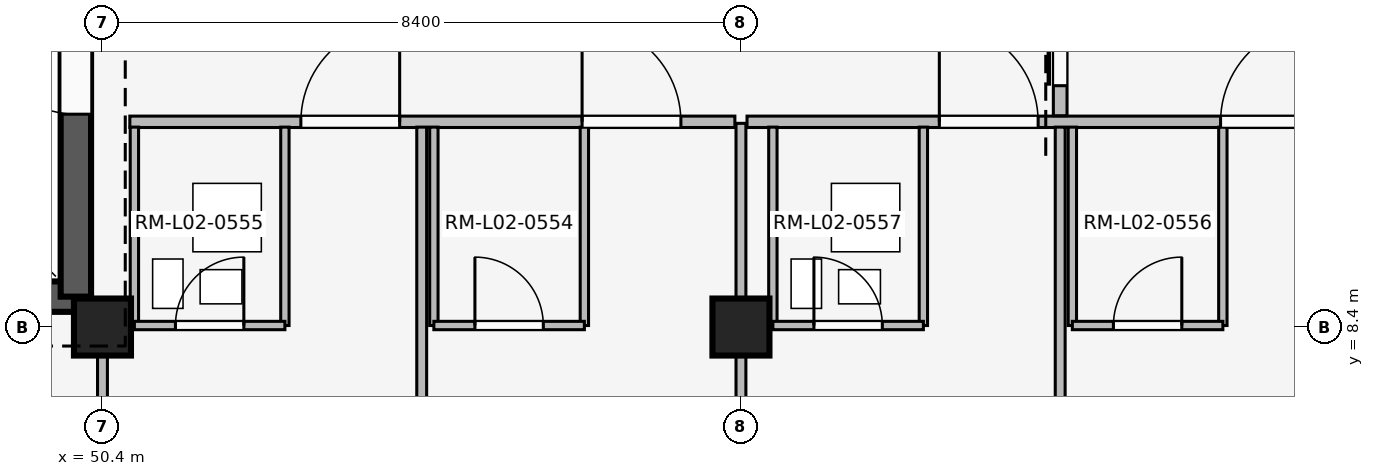
"""IFC4 building model, lengths in metres.
Left out: names, types, materials, properties, quantities, classifications, styles, units other than length and angle.
Written with IfcOpenShell. Run it as: python <this file> out.ifc"""

import sys

from ifc_helpers import new_model, si_unit, direction, frame, frame_2d, origin, origin_2d, place, context, subcontext, project, spatial, rectangle, extrude, element, fill, save


model = new_model("IFC4")
c1 = context("Model", 3, precision=1e-05, world=origin(), true_north=direction((0.0, 1.0)))
c2 = subcontext(c1, "Body", "Model", "MODEL_VIEW")
j1 = project(units=[si_unit("LENGTHUNIT", "METRE"), si_unit("PLANEANGLEUNIT", "RADIAN")], contexts=[c1])
p1 = place(None, origin())
s1 = spatial("IfcSite", under=j1, at=p1, CompositionType="ELEMENT")
p2 = place(p1, origin())
s2 = spatial("IfcBuilding", under=s1, at=p2, CompositionType="ELEMENT")
p3 = place(p2, frame((0.0, 0.0, 8.1)))
s3 = spatial("IfcBuildingStorey", under=s2, at=p3, CompositionType="ELEMENT", Elevation=8.1)
for number, where, z_axis, x_axis in (
    (1, (50.4, 8.4, 0.0), (0.0, 0.0, 1.0), (1.0, 0.0, 0.0)),
    (2, (58.8, 8.4, 0.0), (0.0, 0.0, 1.0), (1.0, 0.0, 0.0)),
):
    element("IfcColumn", number, at=place(p3, frame(where, z_axis=z_axis, x_axis=x_axis)), inside=s3, PredefinedType="COLUMN", context=c2, shape_type="SweptSolid", body=[
        extrude(rectangle(XDim=0.75, YDim=0.75, at=origin_2d()), origin(), (0.0, 0.0, 1.0), 4.8),
    ])
p4 = place(p3, frame((42.55, 8.8, 0.0), z_axis=(0.0, 0.0, 1.0), x_axis=(1.0, 0.0, 0.0)))
e3 = element("IfcWall", 3, at=p4, inside=s3, PredefinedType="SHEAR", context=c2, shape_type="SweptSolid", body=[
    extrude(rectangle(XDim=7.5, YDim=0.4, at=frame_2d((3.75, 0.0))), origin(), (0.0, 0.0, 1.0), 4.52),
])
p5 = place(p4, frame((4.85, 0.0, 0.0)))
e4 = element("IfcOpeningElement", 4, at=p5, cuts=e3, PredefinedType="OPENING", context=c2, shape_type="SweptSolid", body=[
    extrude(rectangle(XDim=1.2, YDim=2.2, at=frame_2d((0.6, 1.1))), frame((0.0, 0.21, 0.0), z_axis=(0.0, -1.0, 0.0), x_axis=(1.0, 0.0, 0.0)), (0.0, 0.0, 1.0), 0.42),
])
p6 = place(p3, frame((50.05, 8.8, 0.0), z_axis=(0.0, 0.0, 1.0), x_axis=(0.0, 1.0, 0.0)))
e5 = element("IfcWall", 5, at=p6, inside=s3, PredefinedType="SHEAR", context=c2, shape_type="SweptSolid", body=[
    extrude(rectangle(XDim=7.55, YDim=0.4, at=frame_2d((3.775, 0.0))), origin(), (0.0, 0.0, 1.0), 4.52),
])
p7 = place(p6, frame((2.4, 0.0, 0.0)))
e6 = element("IfcOpeningElement", 6, at=p7, cuts=e5, PredefinedType="OPENING", context=c2, shape_type="SweptSolid", body=[
    extrude(rectangle(XDim=1.2, YDim=2.2, at=frame_2d((0.6, 1.1))), frame((0.0, 0.21, 0.0), z_axis=(0.0, -1.0, 0.0), x_axis=(1.0, 0.0, 0.0)), (0.0, 0.0, 1.0), 0.42),
])
p8 = place(p3, frame((50.4, 0.14, 0.0), z_axis=(0.0, 0.0, 1.0), x_axis=(0.0, 1.0, 0.0)))
e7 = element("IfcWall", 7, at=p8, inside=s3, PredefinedType="PARTITIONING", context=c2, shape_type="SweptSolid", body=[
    extrude(rectangle(XDim=8.21, YDim=0.13, at=frame_2d((4.105, 0.0))), origin(), (0.0, 0.0, 1.0), 3.84),
])
p9 = place(p8, frame((3.64, 0.0, 0.0)))
e8 = element("IfcOpeningElement", 8, at=p9, cuts=e7, PredefinedType="OPENING", context=c2, shape_type="SweptSolid", body=[
    extrude(rectangle(XDim=1.08, YDim=2.15, at=frame_2d((0.54, 1.075))), frame((0.0, 0.075, 0.0), z_axis=(0.0, -1.0, 0.0), x_axis=(1.0, 0.0, 0.0)), (0.0, 0.0, 1.0), 0.15),
])
p10 = place(p3, frame((50.76, 11.1, 0.0), z_axis=(0.0, 0.0, 1.0), x_axis=(1.0, 0.0, 0.0)))
e9 = element("IfcWall", 9, at=p10, inside=s3, PredefinedType="PARTITIONING", context=c2, shape_type="SweptSolid", body=[
    extrude(rectangle(XDim=7.96, YDim=0.15, at=frame_2d((3.98, 0.0))), origin(), (0.0, 0.0, 1.0), 3.84),
])
p11 = place(p10, frame((2.25, 0.0, 0.0)))
e10 = element("IfcOpeningElement", 10, at=p11, cuts=e9, PredefinedType="OPENING", context=c2, shape_type="SweptSolid", body=[
    extrude(rectangle(XDim=1.3, YDim=2.25, at=frame_2d((0.65, 1.125))), frame((0.0, 0.085, 0.0), z_axis=(0.0, -1.0, 0.0), x_axis=(1.0, 0.0, 0.0)), (0.0, 0.0, 1.0), 0.17),
])
p12 = place(p10, frame((5.95, 0.0, 0.0)))
e11 = element("IfcOpeningElement", 11, at=p12, cuts=e9, PredefinedType="OPENING", context=c2, shape_type="SweptSolid", body=[
    extrude(rectangle(XDim=1.3, YDim=2.25, at=frame_2d((0.65, 1.125))), frame((0.0, 0.085, 0.0), z_axis=(0.0, -1.0, 0.0), x_axis=(1.0, 0.0, 0.0)), (0.0, 0.0, 1.0), 0.17),
])
p13 = place(p3, frame((54.6, 0.1, 0.0), z_axis=(0.0, 0.0, 1.0), x_axis=(0.0, 1.0, 0.0)))
e12 = element("IfcWall", 12, at=p13, inside=s3, PredefinedType="PARTITIONING", context=c2, shape_type="SweptSolid", body=[
    extrude(rectangle(XDim=10.93, YDim=0.13, at=frame_2d((5.465, 0.0))), origin(), (0.0, 0.0, 1.0), 3.84),
])
for number, where, z_axis, x_axis in (
    (13, (50.82, 8.42, 0.0), (0.0, 0.0, 1.0), (0.0, 1.0, 0.0)),
    (14, (52.8, 8.42, 0.0), (0.0, 0.0, 1.0), (0.0, 1.0, 0.0)),
):
    element("IfcWall", number, at=place(p3, frame(where, z_axis=z_axis, x_axis=x_axis)), inside=s3, PredefinedType="PARTITIONING", context=c2, shape_type="SweptSolid", body=[
        extrude(rectangle(XDim=2.61, YDim=0.11, at=frame_2d((1.305, 0.0))), origin(), (0.0, 0.0, 1.0), 3.84),
    ])
p14 = place(p3, frame((50.82, 8.42, 0.0), z_axis=(0.0, 0.0, 1.0), x_axis=(1.0, 0.0, 0.0)))
e15 = element("IfcWall", 15, at=p14, inside=s3, PredefinedType="PARTITIONING", context=c2, shape_type="SweptSolid", body=[
    extrude(rectangle(XDim=1.98, YDim=0.11, at=frame_2d((0.99, 0.0))), origin(), (0.0, 0.0, 1.0), 3.84),
])
p15 = place(p14, frame((0.54, 0.0, 0.0)))
e16 = element("IfcOpeningElement", 16, at=p15, cuts=e15, PredefinedType="OPENING", context=c2, shape_type="SweptSolid", body=[
    extrude(rectangle(XDim=0.9, YDim=2.1, at=frame_2d((0.45, 1.05))), frame((0.0, 0.065, 0.0), z_axis=(0.0, -1.0, 0.0), x_axis=(1.0, 0.0, 0.0)), (0.0, 0.0, 1.0), 0.13),
])
for number, where, z_axis, x_axis in (
    (17, (54.76, 8.42, 0.0), (0.0, 0.0, 1.0), (0.0, 1.0, 0.0)),
    (18, (56.74, 8.42, 0.0), (0.0, 0.0, 1.0), (0.0, 1.0, 0.0)),
):
    element("IfcWall", number, at=place(p3, frame(where, z_axis=z_axis, x_axis=x_axis)), inside=s3, PredefinedType="PARTITIONING", context=c2, shape_type="SweptSolid", body=[
        extrude(rectangle(XDim=2.61, YDim=0.11, at=frame_2d((1.305, 0.0))), origin(), (0.0, 0.0, 1.0), 3.84),
    ])
p16 = place(p3, frame((54.76, 8.42, 0.0), z_axis=(0.0, 0.0, 1.0), x_axis=(1.0, 0.0, 0.0)))
e19 = element("IfcWall", 19, at=p16, inside=s3, PredefinedType="PARTITIONING", context=c2, shape_type="SweptSolid", body=[
    extrude(rectangle(XDim=1.98, YDim=0.11, at=frame_2d((0.99, 0.0))), origin(), (0.0, 0.0, 1.0), 3.84),
])
p17 = place(p16, frame((0.54, 0.0, 0.0)))
e20 = element("IfcOpeningElement", 20, at=p17, cuts=e19, PredefinedType="OPENING", context=c2, shape_type="SweptSolid", body=[
    extrude(rectangle(XDim=0.9, YDim=2.1, at=frame_2d((0.45, 1.05))), frame((0.0, 0.065, 0.0), z_axis=(0.0, -1.0, 0.0), x_axis=(1.0, 0.0, 0.0)), (0.0, 0.0, 1.0), 0.13),
])
p18 = place(p3, frame((58.8, 0.14, 0.0), z_axis=(0.0, 0.0, 1.0), x_axis=(0.0, 1.0, 0.0)))
e21 = element("IfcWall", 21, at=p18, inside=s3, PredefinedType="PARTITIONING", context=c2, shape_type="SweptSolid", body=[
    extrude(rectangle(XDim=10.94, YDim=0.13, at=frame_2d((5.47, 0.0))), origin(), (0.0, 0.0, 1.0), 3.84),
])
p19 = place(p3, frame((58.88, 11.1, 0.0), z_axis=(0.0, 0.0, 1.0), x_axis=(1.0, 0.0, 0.0)))
e22 = element("IfcWall", 22, at=p19, inside=s3, PredefinedType="PARTITIONING", context=c2, shape_type="SweptSolid", body=[
    extrude(rectangle(XDim=8.24, YDim=0.15, at=frame_2d((4.12, 0.0))), origin(), (0.0, 0.0, 1.0), 3.84),
])
p20 = place(p19, frame((2.53, 0.0, 0.0)))
e23 = element("IfcOpeningElement", 23, at=p20, cuts=e22, PredefinedType="OPENING", context=c2, shape_type="SweptSolid", body=[
    extrude(rectangle(XDim=1.3, YDim=2.25, at=frame_2d((0.65, 1.125))), frame((0.0, 0.085, 0.0), z_axis=(0.0, -1.0, 0.0), x_axis=(1.0, 0.0, 0.0)), (0.0, 0.0, 1.0), 0.17),
])
p21 = place(p19, frame((6.23, 0.0, 0.0)))
e24 = element("IfcOpeningElement", 24, at=p21, cuts=e22, PredefinedType="OPENING", context=c2, shape_type="SweptSolid", body=[
    extrude(rectangle(XDim=1.3, YDim=2.25, at=frame_2d((0.65, 1.125))), frame((0.0, 0.085, 0.0), z_axis=(0.0, -1.0, 0.0), x_axis=(1.0, 0.0, 0.0)), (0.0, 0.0, 1.0), 0.17),
])
p22 = place(p3, frame((63.0, 0.1, 0.0), z_axis=(0.0, 0.0, 1.0), x_axis=(0.0, 1.0, 0.0)))
e25 = element("IfcWall", 25, at=p22, inside=s3, PredefinedType="PARTITIONING", context=c2, shape_type="SweptSolid", body=[
    extrude(rectangle(XDim=10.93, YDim=0.13, at=frame_2d((5.465, 0.0))), origin(), (0.0, 0.0, 1.0), 3.84),
])
for number, where, z_axis, x_axis in (
    (26, (59.22, 8.42, 0.0), (0.0, 0.0, 1.0), (0.0, 1.0, 0.0)),
    (27, (61.2, 8.42, 0.0), (0.0, 0.0, 1.0), (0.0, 1.0, 0.0)),
):
    element("IfcWall", number, at=place(p3, frame(where, z_axis=z_axis, x_axis=x_axis)), inside=s3, PredefinedType="PARTITIONING", context=c2, shape_type="SweptSolid", body=[
        extrude(rectangle(XDim=2.61, YDim=0.11, at=frame_2d((1.305, 0.0))), origin(), (0.0, 0.0, 1.0), 3.84),
    ])
p23 = place(p3, frame((59.22, 8.42, 0.0), z_axis=(0.0, 0.0, 1.0), x_axis=(1.0, 0.0, 0.0)))
e28 = element("IfcWall", 28, at=p23, inside=s3, PredefinedType="PARTITIONING", context=c2, shape_type="SweptSolid", body=[
    extrude(rectangle(XDim=1.98, YDim=0.11, at=frame_2d((0.99, 0.0))), origin(), (0.0, 0.0, 1.0), 3.84),
])
p24 = place(p23, frame((0.54, 0.0, 0.0)))
e29 = element("IfcOpeningElement", 29, at=p24, cuts=e28, PredefinedType="OPENING", context=c2, shape_type="SweptSolid", body=[
    extrude(rectangle(XDim=0.9, YDim=2.1, at=frame_2d((0.45, 1.05))), frame((0.0, 0.065, 0.0), z_axis=(0.0, -1.0, 0.0), x_axis=(1.0, 0.0, 0.0)), (0.0, 0.0, 1.0), 0.13),
])
for number, where, z_axis, x_axis in (
    (30, (63.16, 8.42, 0.0), (0.0, 0.0, 1.0), (0.0, 1.0, 0.0)),
    (31, (65.14, 8.42, 0.0), (0.0, 0.0, 1.0), (0.0, 1.0, 0.0)),
):
    element("IfcWall", number, at=place(p3, frame(where, z_axis=z_axis, x_axis=x_axis)), inside=s3, PredefinedType="PARTITIONING", context=c2, shape_type="SweptSolid", body=[
        extrude(rectangle(XDim=2.61, YDim=0.11, at=frame_2d((1.305, 0.0))), origin(), (0.0, 0.0, 1.0), 3.84),
    ])
p25 = place(p3, frame((63.16, 8.42, 0.0), z_axis=(0.0, 0.0, 1.0), x_axis=(1.0, 0.0, 0.0)))
e32 = element("IfcWall", 32, at=p25, inside=s3, PredefinedType="PARTITIONING", context=c2, shape_type="SweptSolid", body=[
    extrude(rectangle(XDim=1.98, YDim=0.11, at=frame_2d((0.99, 0.0))), origin(), (0.0, 0.0, 1.0), 3.84),
])
p26 = place(p25, frame((0.54, 0.0, 0.0)))
e33 = element("IfcOpeningElement", 33, at=p26, cuts=e32, PredefinedType="OPENING", context=c2, shape_type="SweptSolid", body=[
    extrude(rectangle(XDim=0.9, YDim=2.1, at=frame_2d((0.45, 1.05))), frame((0.0, 0.065, 0.0), z_axis=(0.0, -1.0, 0.0), x_axis=(1.0, 0.0, 0.0)), (0.0, 0.0, 1.0), 0.13),
])
p27 = place(p3, frame((63.0, 11.18, 0.0), z_axis=(0.0, 0.0, 1.0), x_axis=(0.0, 1.0, 0.0)))
e34 = element("IfcWall", 34, at=p27, inside=s3, PredefinedType="PARTITIONING", context=c2, shape_type="SweptSolid", body=[
    extrude(rectangle(XDim=2.84, YDim=0.18, at=frame_2d((1.42, 0.0))), origin(), (0.0, 0.0, 1.0), 3.84),
])
p28 = place(p27, frame((0.395, 0.0, 0.0)))
e35 = element("IfcOpeningElement", 35, at=p28, cuts=e34, PredefinedType="OPENING", context=c2, shape_type="SweptSolid", body=[
    extrude(rectangle(XDim=2.05, YDim=2.35, at=frame_2d((1.025, 1.175))), frame((0.0, 0.1, 0.0), z_axis=(0.0, -1.0, 0.0), x_axis=(1.0, 0.0, 0.0)), (0.0, 0.0, 1.0), 0.2),
])
p29 = place(p7, origin())
e36 = element("IfcDoor", 36, at=p29, inside=s3, OperationType="SINGLE_SWING_RIGHT", PredefinedType="DOOR", context=c2, shape_type="SweptSolid", body=[
    extrude(rectangle(XDim=1.2, YDim=2.2, at=frame_2d((0.6, 1.1))), frame((0.0, 0.025, 0.0), z_axis=(0.0, -1.0, 0.0), x_axis=(1.0, 0.0, 0.0)), (0.0, 0.0, 1.0), 0.05),
])
fill(e6, e36)
p30 = place(p11, origin())
e37 = element("IfcDoor", 37, at=p30, inside=s3, OperationType="SINGLE_SWING_RIGHT", PredefinedType="DOOR", context=c2, shape_type="SweptSolid", body=[
    extrude(rectangle(XDim=1.3, YDim=2.25, at=frame_2d((0.65, 1.125))), frame((0.0, 0.025, 0.0), z_axis=(0.0, -1.0, 0.0), x_axis=(1.0, 0.0, 0.0)), (0.0, 0.0, 1.0), 0.05),
])
fill(e10, e37)
p31 = place(p12, origin())
e38 = element("IfcDoor", 38, at=p31, inside=s3, OperationType="SINGLE_SWING_LEFT", PredefinedType="DOOR", context=c2, shape_type="SweptSolid", body=[
    extrude(rectangle(XDim=1.3, YDim=2.25, at=frame_2d((0.65, 1.125))), frame((0.0, 0.025, 0.0), z_axis=(0.0, -1.0, 0.0), x_axis=(1.0, 0.0, 0.0)), (0.0, 0.0, 1.0), 0.05),
])
fill(e11, e38)
p32 = place(p15, origin())
e39 = element("IfcDoor", 39, at=p32, inside=s3, OperationType="SINGLE_SWING_RIGHT", PredefinedType="DOOR", context=c2, shape_type="SweptSolid", body=[
    extrude(rectangle(XDim=0.9, YDim=2.1, at=frame_2d((0.45, 1.05))), frame((0.0, 0.025, 0.0), z_axis=(0.0, -1.0, 0.0), x_axis=(1.0, 0.0, 0.0)), (0.0, 0.0, 1.0), 0.05),
])
fill(e16, e39)
p33 = place(p17, origin())
e40 = element("IfcDoor", 40, at=p33, inside=s3, OperationType="SINGLE_SWING_LEFT", PredefinedType="DOOR", context=c2, shape_type="SweptSolid", body=[
    extrude(rectangle(XDim=0.9, YDim=2.1, at=frame_2d((0.45, 1.05))), frame((0.0, 0.025, 0.0), z_axis=(0.0, -1.0, 0.0), x_axis=(1.0, 0.0, 0.0)), (0.0, 0.0, 1.0), 0.05),
])
fill(e20, e40)
p34 = place(p20, origin())
e41 = element("IfcDoor", 41, at=p34, inside=s3, OperationType="SINGLE_SWING_LEFT", PredefinedType="DOOR", context=c2, shape_type="SweptSolid", body=[
    extrude(rectangle(XDim=1.3, YDim=2.25, at=frame_2d((0.65, 1.125))), frame((0.0, 0.025, 0.0), z_axis=(0.0, -1.0, 0.0), x_axis=(1.0, 0.0, 0.0)), (0.0, 0.0, 1.0), 0.05),
])
fill(e23, e41)
p35 = place(p21, origin())
e42 = element("IfcDoor", 42, at=p35, inside=s3, OperationType="SINGLE_SWING_RIGHT", PredefinedType="DOOR", context=c2, shape_type="SweptSolid", body=[
    extrude(rectangle(XDim=1.3, YDim=2.25, at=frame_2d((0.65, 1.125))), frame((0.0, 0.025, 0.0), z_axis=(0.0, -1.0, 0.0), x_axis=(1.0, 0.0, 0.0)), (0.0, 0.0, 1.0), 0.05),
])
fill(e24, e42)
p36 = place(p24, origin())
e43 = element("IfcDoor", 43, at=p36, inside=s3, OperationType="SINGLE_SWING_LEFT", PredefinedType="DOOR", context=c2, shape_type="SweptSolid", body=[
    extrude(rectangle(XDim=0.9, YDim=2.1, at=frame_2d((0.45, 1.05))), frame((0.0, 0.025, 0.0), z_axis=(0.0, -1.0, 0.0), x_axis=(1.0, 0.0, 0.0)), (0.0, 0.0, 1.0), 0.05),
])
fill(e29, e43)
p37 = place(p26, origin())
e44 = element("IfcDoor", 44, at=p37, inside=s3, OperationType="SINGLE_SWING_RIGHT", PredefinedType="DOOR", context=c2, shape_type="SweptSolid", body=[
    extrude(rectangle(XDim=0.9, YDim=2.1, at=frame_2d((0.45, 1.05))), frame((0.0, 0.025, 0.0), z_axis=(0.0, -1.0, 0.0), x_axis=(1.0, 0.0, 0.0)), (0.0, 0.0, 1.0), 0.05),
])
fill(e33, e44)
p38 = place(p28, origin())
e45 = element("IfcDoor", 45, at=p38, inside=s3, OperationType="SLIDING_TO_LEFT", PredefinedType="DOOR", context=c2, shape_type="SweptSolid", body=[
    extrude(rectangle(XDim=2.05, YDim=2.35, at=frame_2d((1.025, 1.175))), frame((0.0, 0.025, 0.0), z_axis=(0.0, -1.0, 0.0), x_axis=(1.0, 0.0, 0.0)), (0.0, 0.0, 1.0), 0.05),
])
fill(e35, e45)
save(model, sys.argv[1])
